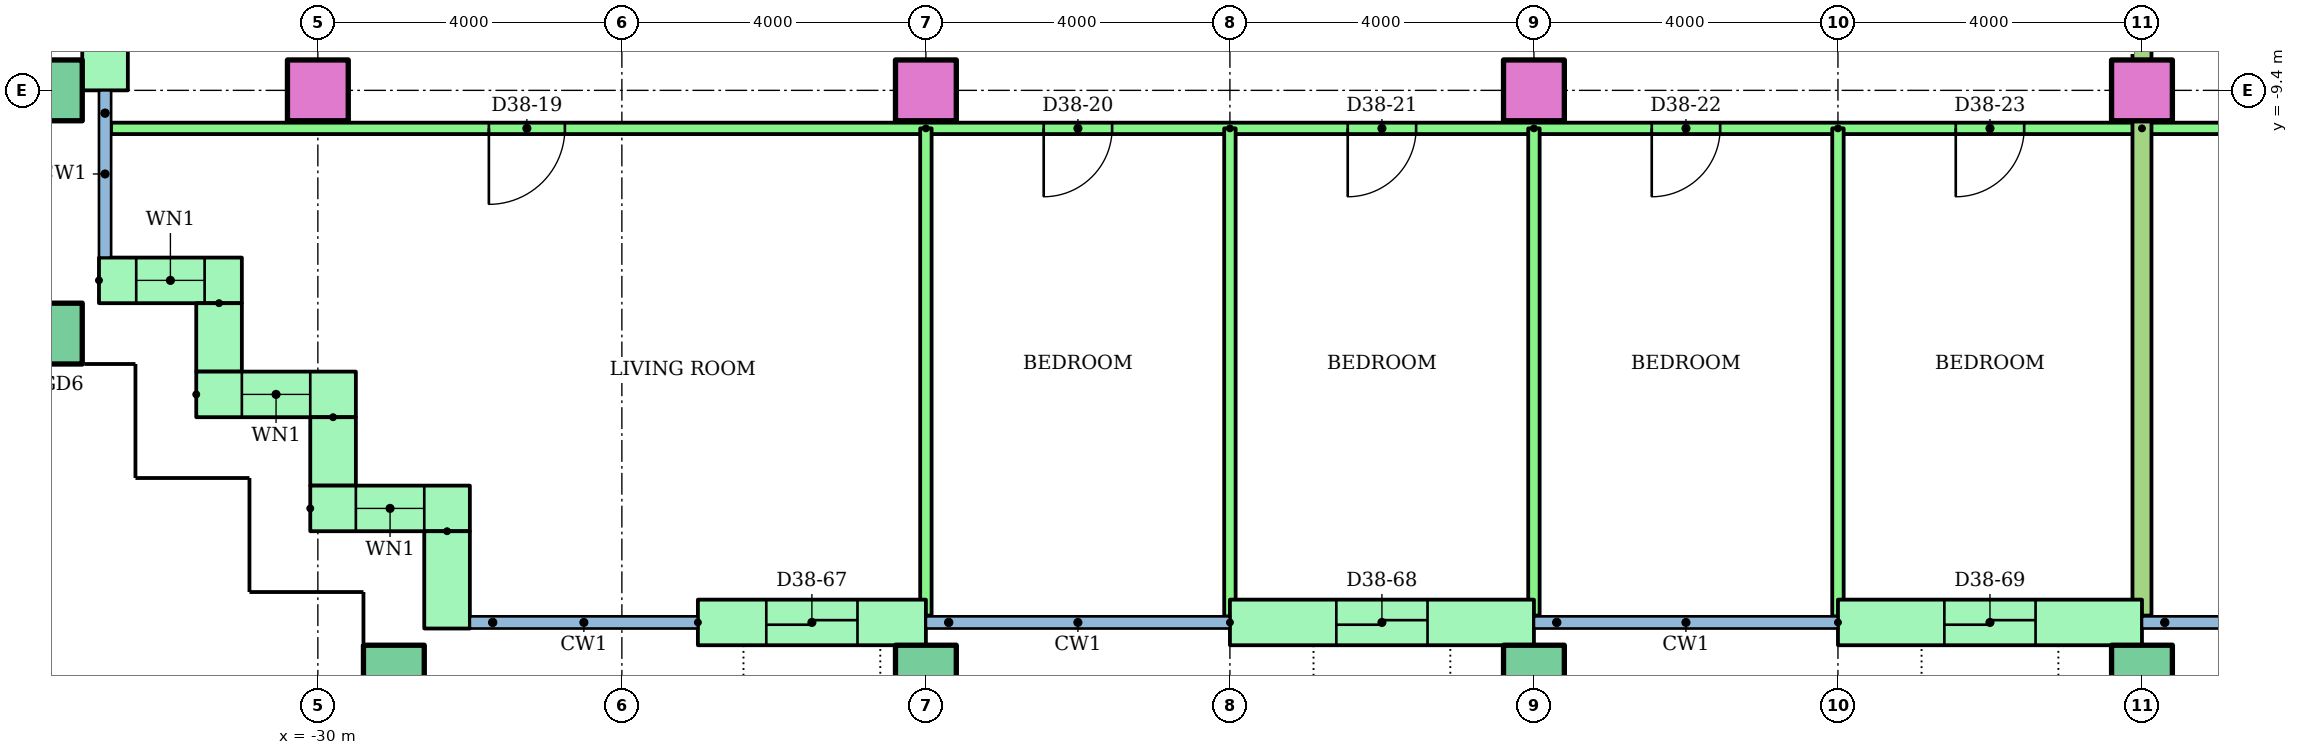
"""IFC4 building model, lengths in metres.
Left out: names, types, materials, properties, quantities, classifications, styles, units other than length and angle.
Written with IfcOpenShell. Run it as: python <this file> out.ifc"""

import sys

from ifc_helpers import new_model, si_unit, direction, frame, frame_2d, origin, origin_2d, place, context, subcontext, project, spatial, rectangle, hollow_rectangle, extrude, element, fill, save


model = new_model("IFC4")
c1 = context("Model", 3, precision=1e-05, world=origin(), true_north=direction((0.0, 1.0)))
c2 = subcontext(c1, "Body", "Model", "MODEL_VIEW")
j1 = project(units=[si_unit("LENGTHUNIT", "METRE"), si_unit("PLANEANGLEUNIT", "RADIAN")], contexts=[c1])
p1 = place(None, origin())
s1 = spatial("IfcSite", under=j1, at=p1, CompositionType="ELEMENT")
p2 = place(p1, origin())
s2 = spatial("IfcBuilding", under=s1, at=p2, CompositionType="ELEMENT")
p3 = place(p2, frame((0.0, 0.0, 145.4)))
s3 = spatial("IfcBuildingStorey", under=s2, at=p3, CompositionType="ELEMENT", Elevation=145.4)
for number, where in (
    (1, (-29.0, -17.1, 0.0)),
    (2, (-22.0, -17.1, 0.0)),
    (3, (-14.0, -17.1, 0.0)),
    (4, (-6.0, -17.1, 0.0)),
    (5, (-33.5, -12.6, 0.0)),
    (6, (-33.5, -9.4, 0.0)),
):
    element("IfcColumn", number, at=place(p3, frame(where)), inside=s3, PredefinedType="COLUMN", context=c2, shape_type="SweptSolid", body=[
        extrude(hollow_rectangle(XDim=0.8, YDim=0.8, WallThickness=0.04, at=origin_2d()), origin(), (0.0, 0.0, 1.0), 3.2),
    ])
for number, where in (
    (7, (-30.0, -9.4, 0.0)),
    (8, (-22.0, -9.4, 0.0)),
    (9, (-14.0, -9.4, 0.0)),
    (10, (-6.0, -9.4, 0.0)),
):
    element("IfcColumn", number, at=place(p3, frame(where)), inside=s3, PredefinedType="COLUMN", context=c2, shape_type="SweptSolid", body=[
        extrude(rectangle(XDim=0.8, YDim=0.8, at=origin_2d()), origin(), (0.0, 0.0, 1.0), 3.2),
    ])
p4 = place(p3, frame((-32.8, -5.7, 0.0), z_axis=(0.0, 0.0, 1.0), x_axis=(0.0, -1.0, 0.0)))
e11 = element("IfcWall", 11, at=p4, inside=s3, PredefinedType="STANDARD", context=c2, shape_type="SweptSolid", body=[
    extrude(rectangle(XDim=3.7, YDim=0.6, at=frame_2d((1.85, 0.0))), origin(), (0.0, 0.0, 1.0), 2.92),
])
p5 = place(p4, frame((1.25, 0.0, 0.0)))
e12 = element("IfcOpeningElement", 12, at=p5, cuts=e11, PredefinedType="OPENING", context=c2, shape_type="SweptSolid", body=[
    extrude(rectangle(XDim=1.2, YDim=2.1, at=frame_2d((0.6, 1.05))), frame((0.0, 0.31, 0.0), z_axis=(0.0, -1.0, 0.0), x_axis=(1.0, 0.0, 0.0)), (0.0, 0.0, 1.0), 0.62),
])
p6 = place(p3, frame((-32.88, -11.9, 0.0)))
e13 = element("IfcWall", 13, at=p6, inside=s3, PredefinedType="STANDARD", context=c2, shape_type="SweptSolid", body=[
    extrude(rectangle(XDim=1.88, YDim=0.6, at=frame_2d((0.94, 0.0))), origin(), (0.0, 0.0, 1.0), 2.92),
])
p7 = place(p6, frame((0.49, 0.0, 0.9)))
e14 = element("IfcOpeningElement", 14, at=p7, cuts=e13, PredefinedType="OPENING", context=c2, shape_type="SweptSolid", body=[
    extrude(rectangle(XDim=0.9, YDim=1.5, at=frame_2d((0.45, 0.75))), frame((0.0, 0.31, 0.0), z_axis=(0.0, -1.0, 0.0), x_axis=(1.0, 0.0, 0.0)), (0.0, 0.0, 1.0), 0.62),
])
p8 = place(p3, frame((-31.3, -12.2, 0.0), z_axis=(0.0, 0.0, 1.0), x_axis=(0.0, -1.0, 0.0)))
e15 = element("IfcWall", 15, at=p8, inside=s3, PredefinedType="STANDARD", context=c2, shape_type="SweptSolid", body=[
    extrude(rectangle(XDim=0.9, YDim=0.6, at=frame_2d((0.45, 0.0))), origin(), (0.0, 0.0, 1.0), 2.92),
])
p9 = place(p3, frame((-31.6, -13.4, 0.0)))
e16 = element("IfcWall", 16, at=p9, inside=s3, PredefinedType="STANDARD", context=c2, shape_type="SweptSolid", body=[
    extrude(rectangle(XDim=2.1, YDim=0.6, at=frame_2d((1.05, 0.0))), origin(), (0.0, 0.0, 1.0), 2.92),
])
p10 = place(p9, frame((0.6, 0.0, 0.9)))
e17 = element("IfcOpeningElement", 17, at=p10, cuts=e16, PredefinedType="OPENING", context=c2, shape_type="SweptSolid", body=[
    extrude(rectangle(XDim=0.9, YDim=1.5, at=frame_2d((0.45, 0.75))), frame((0.0, 0.31, 0.0), z_axis=(0.0, -1.0, 0.0), x_axis=(1.0, 0.0, 0.0)), (0.0, 0.0, 1.0), 0.62),
])
p11 = place(p3, frame((-29.8, -13.7, 0.0), z_axis=(0.0, 0.0, 1.0), x_axis=(0.0, -1.0, 0.0)))
e18 = element("IfcWall", 18, at=p11, inside=s3, PredefinedType="STANDARD", context=c2, shape_type="SweptSolid", body=[
    extrude(rectangle(XDim=0.9, YDim=0.6, at=frame_2d((0.45, 0.0))), origin(), (0.0, 0.0, 1.0), 2.92),
])
p12 = place(p3, frame((-30.1, -14.9, 0.0)))
e19 = element("IfcWall", 19, at=p12, inside=s3, PredefinedType="STANDARD", context=c2, shape_type="SweptSolid", body=[
    extrude(rectangle(XDim=2.1, YDim=0.6, at=frame_2d((1.05, 0.0))), origin(), (0.0, 0.0, 1.0), 2.92),
])
p13 = place(p12, frame((0.6, 0.0, 0.9)))
e20 = element("IfcOpeningElement", 20, at=p13, cuts=e19, PredefinedType="OPENING", context=c2, shape_type="SweptSolid", body=[
    extrude(rectangle(XDim=0.9, YDim=1.5, at=frame_2d((0.45, 0.75))), frame((0.0, 0.31, 0.0), z_axis=(0.0, -1.0, 0.0), x_axis=(1.0, 0.0, 0.0)), (0.0, 0.0, 1.0), 0.62),
])
p14 = place(p3, frame((-28.3, -15.2, 0.0), z_axis=(0.0, 0.0, 1.0), x_axis=(0.0, -1.0, 0.0)))
e21 = element("IfcWall", 21, at=p14, inside=s3, PredefinedType="STANDARD", context=c2, shape_type="SweptSolid", body=[
    extrude(rectangle(XDim=1.28, YDim=0.6, at=frame_2d((0.64, 0.0))), origin(), (0.0, 0.0, 1.0), 2.92),
])
p15 = place(p3, frame((-25.0, -16.4, 0.0)))
e22 = element("IfcWall", 22, at=p15, inside=s3, PredefinedType="STANDARD", context=c2, shape_type="SweptSolid", body=[
    extrude(rectangle(XDim=3.0, YDim=0.6, at=frame_2d((1.5, 0.0))), origin(), (0.0, 0.0, 1.0), 2.92),
])
p16 = place(p15, frame((0.9, 0.0, 0.0)))
e23 = element("IfcOpeningElement", 23, at=p16, cuts=e22, PredefinedType="OPENING", context=c2, shape_type="SweptSolid", body=[
    extrude(rectangle(XDim=1.2, YDim=2.1, at=frame_2d((0.6, 1.05))), frame((0.0, 0.31, 0.0), z_axis=(0.0, -1.0, 0.0), x_axis=(1.0, 0.0, 0.0)), (0.0, 0.0, 1.0), 0.62),
])
p17 = place(p3, frame((-18.0, -16.4, 0.0)))
e24 = element("IfcWall", 24, at=p17, inside=s3, PredefinedType="STANDARD", context=c2, shape_type="SweptSolid", body=[
    extrude(rectangle(XDim=4.0, YDim=0.6, at=frame_2d((2.0, 0.0))), origin(), (0.0, 0.0, 1.0), 2.92),
])
p18 = place(p17, frame((1.4, 0.0, 0.0)))
e25 = element("IfcOpeningElement", 25, at=p18, cuts=e24, PredefinedType="OPENING", context=c2, shape_type="SweptSolid", body=[
    extrude(rectangle(XDim=1.2, YDim=2.1, at=frame_2d((0.6, 1.05))), frame((0.0, 0.31, 0.0), z_axis=(0.0, -1.0, 0.0), x_axis=(1.0, 0.0, 0.0)), (0.0, 0.0, 1.0), 0.62),
])
p19 = place(p3, frame((-10.0, -16.4, 0.0)))
e26 = element("IfcWall", 26, at=p19, inside=s3, PredefinedType="STANDARD", context=c2, shape_type="SweptSolid", body=[
    extrude(rectangle(XDim=4.0, YDim=0.6, at=frame_2d((2.0, 0.0))), origin(), (0.0, 0.0, 1.0), 2.92),
])
p20 = place(p19, frame((1.4, 0.0, 0.0)))
e27 = element("IfcOpeningElement", 27, at=p20, cuts=e26, PredefinedType="OPENING", context=c2, shape_type="SweptSolid", body=[
    extrude(rectangle(XDim=1.2, YDim=2.1, at=frame_2d((0.6, 1.05))), frame((0.0, 0.31, 0.0), z_axis=(0.0, -1.0, 0.0), x_axis=(1.0, 0.0, 0.0)), (0.0, 0.0, 1.0), 0.62),
])
p21 = place(p3, frame((-6.0, -9.9, 0.0), z_axis=(0.0, 0.0, 1.0), x_axis=(-1.0, 0.0, 0.0)))
e28 = element("IfcWall", 28, at=p21, inside=s3, PredefinedType="PARTITIONING", context=c2, shape_type="SweptSolid", body=[
    extrude(rectangle(XDim=26.72, YDim=0.15, at=frame_2d((13.36, 0.0))), origin(), (0.0, 0.0, 1.0), 2.4),
])
p22 = place(p21, frame((20.75, 0.0, 0.0)))
e29 = element("IfcOpeningElement", 29, at=p22, cuts=e28, PredefinedType="OPENING", context=c2, shape_type="SweptSolid", body=[
    extrude(rectangle(XDim=1.0, YDim=2.1, at=frame_2d((0.5, 1.05))), frame((0.0, 0.085, 0.0), z_axis=(0.0, -1.0, 0.0), x_axis=(1.0, 0.0, 0.0)), (0.0, 0.0, 1.0), 0.17),
])
p23 = place(p21, frame((13.55, 0.0, 0.0)))
e30 = element("IfcOpeningElement", 30, at=p23, cuts=e28, PredefinedType="OPENING", context=c2, shape_type="SweptSolid", body=[
    extrude(rectangle(XDim=0.9, YDim=2.1, at=frame_2d((0.45, 1.05))), frame((0.0, 0.085, 0.0), z_axis=(0.0, -1.0, 0.0), x_axis=(1.0, 0.0, 0.0)), (0.0, 0.0, 1.0), 0.17),
])
p24 = place(p21, frame((9.55, 0.0, 0.0)))
e31 = element("IfcOpeningElement", 31, at=p24, cuts=e28, PredefinedType="OPENING", context=c2, shape_type="SweptSolid", body=[
    extrude(rectangle(XDim=0.9, YDim=2.1, at=frame_2d((0.45, 1.05))), frame((0.0, 0.085, 0.0), z_axis=(0.0, -1.0, 0.0), x_axis=(1.0, 0.0, 0.0)), (0.0, 0.0, 1.0), 0.17),
])
p25 = place(p21, frame((5.55, 0.0, 0.0)))
e32 = element("IfcOpeningElement", 32, at=p25, cuts=e28, PredefinedType="OPENING", context=c2, shape_type="SweptSolid", body=[
    extrude(rectangle(XDim=0.9, YDim=2.1, at=frame_2d((0.45, 1.05))), frame((0.0, 0.085, 0.0), z_axis=(0.0, -1.0, 0.0), x_axis=(1.0, 0.0, 0.0)), (0.0, 0.0, 1.0), 0.17),
])
p26 = place(p21, frame((1.55, 0.0, 0.0)))
e33 = element("IfcOpeningElement", 33, at=p26, cuts=e28, PredefinedType="OPENING", context=c2, shape_type="SweptSolid", body=[
    extrude(rectangle(XDim=0.9, YDim=2.1, at=frame_2d((0.45, 1.05))), frame((0.0, 0.085, 0.0), z_axis=(0.0, -1.0, 0.0), x_axis=(1.0, 0.0, 0.0)), (0.0, 0.0, 1.0), 0.17),
])
p27 = place(p3, frame((-22.0, -9.9, 0.0), z_axis=(0.0, 0.0, 1.0), x_axis=(0.0, -1.0, 0.0)))
e34 = element("IfcWall", 34, at=p27, inside=s3, PredefinedType="PARTITIONING", context=c2, shape_type="SweptSolid", body=[
    extrude(rectangle(XDim=6.41, YDim=0.15, at=frame_2d((3.205, 0.0))), origin(), (0.0, 0.0, 1.0), 2.4),
])
p28 = place(p3, frame((-18.0, -9.9, 0.0), z_axis=(0.0, 0.0, 1.0), x_axis=(0.0, -1.0, 0.0)))
e35 = element("IfcWall", 35, at=p28, inside=s3, PredefinedType="PARTITIONING", context=c2, shape_type="SweptSolid", body=[
    extrude(rectangle(XDim=6.421, YDim=0.15, at=frame_2d((3.21, 0.0))), origin(), (0.0, 0.0, 1.0), 2.4),
])
p29 = place(p3, frame((-14.0, -9.9, 0.0), z_axis=(0.0, 0.0, 1.0), x_axis=(0.0, -1.0, 0.0)))
e36 = element("IfcWall", 36, at=p29, inside=s3, PredefinedType="PARTITIONING", context=c2, shape_type="SweptSolid", body=[
    extrude(rectangle(XDim=6.41, YDim=0.15, at=frame_2d((3.205, 0.0))), origin(), (0.0, 0.0, 1.0), 2.4),
])
p30 = place(p3, frame((-10.0, -9.9, 0.0), z_axis=(0.0, 0.0, 1.0), x_axis=(0.0, -1.0, 0.0)))
e37 = element("IfcWall", 37, at=p30, inside=s3, PredefinedType="PARTITIONING", context=c2, shape_type="SweptSolid", body=[
    extrude(rectangle(XDim=6.421, YDim=0.15, at=frame_2d((3.21, 0.0))), origin(), (0.0, 0.0, 1.0), 2.4),
])
p31 = place(p3, frame((18.0, -9.9, 0.0), z_axis=(0.0, 0.0, 1.0), x_axis=(-1.0, 0.0, 0.0)))
e38 = element("IfcWall", 38, at=p31, inside=s3, PredefinedType="PARTITIONING", context=c2, shape_type="SweptSolid", body=[
    extrude(rectangle(XDim=24.0, YDim=0.15, at=frame_2d((12.0, 0.0))), origin(), (0.0, 0.0, 1.0), 2.4),
])
p32 = place(p31, frame((19.5, 0.0, 0.0)))
e39 = element("IfcOpeningElement", 39, at=p32, cuts=e38, PredefinedType="OPENING", context=c2, shape_type="SweptSolid", body=[
    extrude(rectangle(XDim=1.0, YDim=2.1, at=frame_2d((0.5, 1.05))), frame((0.0, 0.085, 0.0), z_axis=(0.0, -1.0, 0.0), x_axis=(1.0, 0.0, 0.0)), (0.0, 0.0, 1.0), 0.17),
])
p33 = place(p31, frame((13.55, 0.0, 0.0)))
e40 = element("IfcOpeningElement", 40, at=p33, cuts=e38, PredefinedType="OPENING", context=c2, shape_type="SweptSolid", body=[
    extrude(rectangle(XDim=0.9, YDim=2.1, at=frame_2d((0.45, 1.05))), frame((0.0, 0.085, 0.0), z_axis=(0.0, -1.0, 0.0), x_axis=(1.0, 0.0, 0.0)), (0.0, 0.0, 1.0), 0.17),
])
p34 = place(p31, frame((9.55, 0.0, 0.0)))
e41 = element("IfcOpeningElement", 41, at=p34, cuts=e38, PredefinedType="OPENING", context=c2, shape_type="SweptSolid", body=[
    extrude(rectangle(XDim=0.9, YDim=2.1, at=frame_2d((0.45, 1.05))), frame((0.0, 0.085, 0.0), z_axis=(0.0, -1.0, 0.0), x_axis=(1.0, 0.0, 0.0)), (0.0, 0.0, 1.0), 0.17),
])
p35 = place(p31, frame((5.55, 0.0, 0.0)))
e42 = element("IfcOpeningElement", 42, at=p35, cuts=e38, PredefinedType="OPENING", context=c2, shape_type="SweptSolid", body=[
    extrude(rectangle(XDim=0.9, YDim=2.1, at=frame_2d((0.45, 1.05))), frame((0.0, 0.085, 0.0), z_axis=(0.0, -1.0, 0.0), x_axis=(1.0, 0.0, 0.0)), (0.0, 0.0, 1.0), 0.17),
])
p36 = place(p31, frame((1.55, 0.0, 0.0)))
e43 = element("IfcOpeningElement", 43, at=p36, cuts=e38, PredefinedType="OPENING", context=c2, shape_type="SweptSolid", body=[
    extrude(rectangle(XDim=0.9, YDim=2.1, at=frame_2d((0.45, 1.05))), frame((0.0, 0.085, 0.0), z_axis=(0.0, -1.0, 0.0), x_axis=(1.0, 0.0, 0.0)), (0.0, 0.0, 1.0), 0.17),
])
p37 = place(p3, frame((-6.0, -1.4, 0.0), z_axis=(0.0, 0.0, 1.0), x_axis=(0.0, -1.0, 0.0)))
e44 = element("IfcWall", 44, at=p37, inside=s3, PredefinedType="PARTITIONING", context=c2, shape_type="SweptSolid", body=[
    extrude(rectangle(XDim=14.91, YDim=0.25, at=frame_2d((7.455, 0.0))), origin(), (0.0, 0.0, 1.0), 2.4),
])
p38 = place(p7, origin())
e45 = element("IfcWindow", 45, at=p38, inside=s3, PartitioningType="SINGLE_PANEL", PredefinedType="WINDOW", context=c2, shape_type="SweptSolid", body=[
    extrude(rectangle(XDim=0.9, YDim=1.5, at=frame_2d((0.45, 0.75))), frame((0.0, 0.03, 0.0), z_axis=(0.0, -1.0, 0.0), x_axis=(1.0, 0.0, 0.0)), (0.0, 0.0, 1.0), 0.06),
])
fill(e14, e45)
p39 = place(p10, origin())
e46 = element("IfcWindow", 46, at=p39, inside=s3, PartitioningType="SINGLE_PANEL", PredefinedType="WINDOW", context=c2, shape_type="SweptSolid", body=[
    extrude(rectangle(XDim=0.9, YDim=1.5, at=frame_2d((0.45, 0.75))), frame((0.0, 0.03, 0.0), z_axis=(0.0, -1.0, 0.0), x_axis=(1.0, 0.0, 0.0)), (0.0, 0.0, 1.0), 0.06),
])
fill(e17, e46)
p40 = place(p13, origin())
e47 = element("IfcWindow", 47, at=p40, inside=s3, PartitioningType="SINGLE_PANEL", PredefinedType="WINDOW", context=c2, shape_type="SweptSolid", body=[
    extrude(rectangle(XDim=0.9, YDim=1.5, at=frame_2d((0.45, 0.75))), frame((0.0, 0.03, 0.0), z_axis=(0.0, -1.0, 0.0), x_axis=(1.0, 0.0, 0.0)), (0.0, 0.0, 1.0), 0.06),
])
fill(e20, e47)
p41 = place(p22, origin())
e48 = element("IfcDoor", 48, at=p41, inside=s3, OperationType="SINGLE_SWING_RIGHT", PredefinedType="DOOR", context=c2, shape_type="SweptSolid", body=[
    extrude(rectangle(XDim=1.0, YDim=2.1, at=frame_2d((0.5, 1.05))), frame((0.0, 0.025, 0.0), z_axis=(0.0, -1.0, 0.0), x_axis=(1.0, 0.0, 0.0)), (0.0, 0.0, 1.0), 0.05),
])
fill(e29, e48)
p42 = place(p23, origin())
e49 = element("IfcDoor", 49, at=p42, inside=s3, OperationType="SINGLE_SWING_RIGHT", PredefinedType="DOOR", context=c2, shape_type="SweptSolid", body=[
    extrude(rectangle(XDim=0.9, YDim=2.1, at=frame_2d((0.45, 1.05))), frame((0.0, 0.025, 0.0), z_axis=(0.0, -1.0, 0.0), x_axis=(1.0, 0.0, 0.0)), (0.0, 0.0, 1.0), 0.05),
])
fill(e30, e49)
p43 = place(p24, origin())
e50 = element("IfcDoor", 50, at=p43, inside=s3, OperationType="SINGLE_SWING_RIGHT", PredefinedType="DOOR", context=c2, shape_type="SweptSolid", body=[
    extrude(rectangle(XDim=0.9, YDim=2.1, at=frame_2d((0.45, 1.05))), frame((0.0, 0.025, 0.0), z_axis=(0.0, -1.0, 0.0), x_axis=(1.0, 0.0, 0.0)), (0.0, 0.0, 1.0), 0.05),
])
fill(e31, e50)
p44 = place(p25, origin())
e51 = element("IfcDoor", 51, at=p44, inside=s3, OperationType="SINGLE_SWING_RIGHT", PredefinedType="DOOR", context=c2, shape_type="SweptSolid", body=[
    extrude(rectangle(XDim=0.9, YDim=2.1, at=frame_2d((0.45, 1.05))), frame((0.0, 0.025, 0.0), z_axis=(0.0, -1.0, 0.0), x_axis=(1.0, 0.0, 0.0)), (0.0, 0.0, 1.0), 0.05),
])
fill(e32, e51)
p45 = place(p26, origin())
e52 = element("IfcDoor", 52, at=p45, inside=s3, OperationType="SINGLE_SWING_RIGHT", PredefinedType="DOOR", context=c2, shape_type="SweptSolid", body=[
    extrude(rectangle(XDim=0.9, YDim=2.1, at=frame_2d((0.45, 1.05))), frame((0.0, 0.025, 0.0), z_axis=(0.0, -1.0, 0.0), x_axis=(1.0, 0.0, 0.0)), (0.0, 0.0, 1.0), 0.05),
])
fill(e33, e52)
p46 = place(p16, origin())
e53 = element("IfcDoor", 53, at=p46, inside=s3, OperationType="SLIDING_TO_LEFT", PredefinedType="DOOR", context=c2, shape_type="SweptSolid", body=[
    extrude(rectangle(XDim=1.2, YDim=2.1, at=frame_2d((0.6, 1.05))), frame((0.0, 0.025, 0.0), z_axis=(0.0, -1.0, 0.0), x_axis=(1.0, 0.0, 0.0)), (0.0, 0.0, 1.0), 0.05),
])
fill(e23, e53)
p47 = place(p18, origin())
e54 = element("IfcDoor", 54, at=p47, inside=s3, OperationType="SLIDING_TO_LEFT", PredefinedType="DOOR", context=c2, shape_type="SweptSolid", body=[
    extrude(rectangle(XDim=1.2, YDim=2.1, at=frame_2d((0.6, 1.05))), frame((0.0, 0.025, 0.0), z_axis=(0.0, -1.0, 0.0), x_axis=(1.0, 0.0, 0.0)), (0.0, 0.0, 1.0), 0.05),
])
fill(e25, e54)
p48 = place(p20, origin())
e55 = element("IfcDoor", 55, at=p48, inside=s3, OperationType="SLIDING_TO_LEFT", PredefinedType="DOOR", context=c2, shape_type="SweptSolid", body=[
    extrude(rectangle(XDim=1.2, YDim=2.1, at=frame_2d((0.6, 1.05))), frame((0.0, 0.025, 0.0), z_axis=(0.0, -1.0, 0.0), x_axis=(1.0, 0.0, 0.0)), (0.0, 0.0, 1.0), 0.05),
])
fill(e27, e55)
save(model, sys.argv[1])
